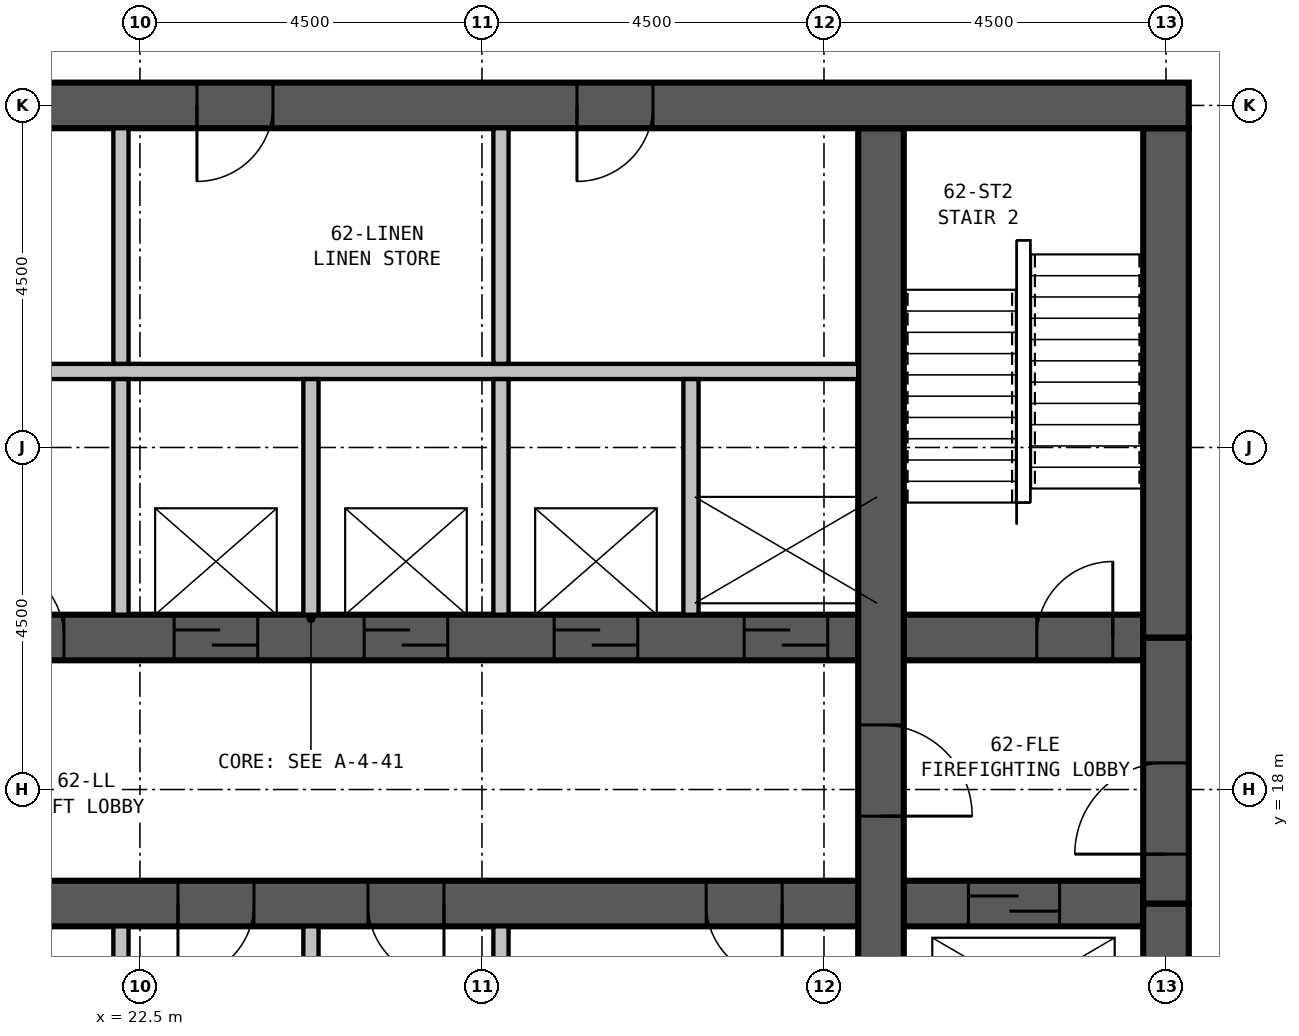
"""IFC4 building model, lengths in metres.
Left out: names, types, materials, properties, quantities, classifications, styles, units other than length and angle.
Written with IfcOpenShell. Run it as: python <this file> out.ifc"""

import sys

from ifc_helpers import new_model, si_unit, direction, frame, frame_2d, origin, place, context, subcontext, project, spatial, rectangle, extrude, element, fill, save


model = new_model("IFC4")
c1 = context("Model", 3, precision=1e-05, world=origin(), true_north=direction((0.0, 1.0)))
c2 = subcontext(c1, "Body", "Model", "MODEL_VIEW")
j1 = project(units=[si_unit("LENGTHUNIT", "METRE"), si_unit("PLANEANGLEUNIT", "RADIAN")], contexts=[c1])
p1 = place(None, origin())
s1 = spatial("IfcSite", under=j1, at=p1, CompositionType="ELEMENT")
p2 = place(p1, origin())
s2 = spatial("IfcBuilding", under=s1, at=p2, CompositionType="ELEMENT")
p3 = place(p2, frame((0.0, 0.0, 240.8)))
s3 = spatial("IfcBuildingStorey", under=s2, at=p3, CompositionType="ELEMENT", Elevation=240.8)
p4 = place(p3, frame((36.3, 27.0, 0.0), z_axis=(0.0, 0.0, 1.0), x_axis=(-1.0, 0.0, 0.0)))
e1 = element("IfcWall", 1, at=p4, inside=s3, PredefinedType="SHEAR", context=c2, shape_type="SweptSolid", body=[
    extrude(rectangle(XDim=23.45, YDim=0.6, at=frame_2d((11.725, 0.0))), origin(), (0.0, 0.0, 1.0), 3.9),
])
p5 = place(p4, frame((17.05, 0.0, 0.0)))
e2 = element("IfcOpeningElement", 2, at=p5, cuts=e1, PredefinedType="OPENING", context=c2, shape_type="SweptSolid", body=[
    extrude(rectangle(XDim=1.0, YDim=2.1, at=frame_2d((0.5, 1.05))), frame((0.0, 0.31, 0.0), z_axis=(0.0, -1.0, 0.0), x_axis=(1.0, 0.0, 0.0)), (0.0, 0.0, 1.0), 0.62),
])
p6 = place(p4, frame((12.05, 0.0, 0.0)))
e3 = element("IfcOpeningElement", 3, at=p6, cuts=e1, PredefinedType="OPENING", context=c2, shape_type="SweptSolid", body=[
    extrude(rectangle(XDim=1.0, YDim=2.1, at=frame_2d((0.5, 1.05))), frame((0.0, 0.31, 0.0), z_axis=(0.0, -1.0, 0.0), x_axis=(1.0, 0.0, 0.0)), (0.0, 0.0, 1.0), 0.62),
])
p7 = place(p4, frame((7.05, 0.0, 0.0)))
e4 = element("IfcOpeningElement", 4, at=p7, cuts=e1, PredefinedType="OPENING", context=c2, shape_type="SweptSolid", body=[
    extrude(rectangle(XDim=1.0, YDim=2.1, at=frame_2d((0.5, 1.05))), frame((0.0, 0.31, 0.0), z_axis=(0.0, -1.0, 0.0), x_axis=(1.0, 0.0, 0.0)), (0.0, 0.0, 1.0), 0.62),
])
p8 = place(p3, frame((32.25, 13.8, 0.0), z_axis=(0.0, 0.0, 1.0), x_axis=(0.0, 1.0, 0.0)))
e5 = element("IfcWall", 5, at=p8, inside=s3, PredefinedType="SHEAR", context=c2, shape_type="SweptSolid", body=[
    extrude(rectangle(XDim=12.9, YDim=0.6, at=frame_2d((6.45, 0.0))), origin(), (0.0, 0.0, 1.0), 3.9),
])
p9 = place(p8, frame((5.05, 0.0, 0.0), z_axis=(0.0, 0.0, 1.0), x_axis=(-1.0, 0.0, 0.0)))
e6 = element("IfcOpeningElement", 6, at=p9, cuts=e5, PredefinedType="OPENING", context=c2, shape_type="SweptSolid", body=[
    extrude(rectangle(XDim=1.2, YDim=2.1, at=frame_2d((0.6, 1.05))), frame((0.0, 0.31, 0.0), z_axis=(0.0, -1.0, 0.0), x_axis=(1.0, 0.0, 0.0)), (0.0, 0.0, 1.0), 0.62),
])
p10 = place(p3, frame((13.8, 16.5, 0.0), z_axis=(0.0, 0.0, 1.0), x_axis=(1.0, 0.0, 0.0)))
e7 = element("IfcWall", 7, at=p10, inside=s3, PredefinedType="SHEAR", context=c2, shape_type="SweptSolid", body=[
    extrude(rectangle(XDim=21.9, YDim=0.6, at=frame_2d((10.95, 0.0))), origin(), (0.0, 0.0, 1.0), 3.9),
])
p11 = place(p10, frame((5.75, 0.0, 0.0), z_axis=(0.0, 0.0, 1.0), x_axis=(-1.0, 0.0, 0.0)))
e8 = element("IfcOpeningElement", 8, at=p11, cuts=e7, PredefinedType="OPENING", context=c2, shape_type="SweptSolid", body=[
    extrude(rectangle(XDim=1.0, YDim=2.1, at=frame_2d((0.5, 1.05))), frame((0.0, 0.31, 0.0), z_axis=(0.0, -1.0, 0.0), x_axis=(1.0, 0.0, 0.0)), (0.0, 0.0, 1.0), 0.62),
])
p12 = place(p10, frame((10.2, 0.0, 0.0), z_axis=(0.0, 0.0, 1.0), x_axis=(-1.0, 0.0, 0.0)))
e9 = element("IfcOpeningElement", 9, at=p12, cuts=e7, PredefinedType="OPENING", context=c2, shape_type="SweptSolid", body=[
    extrude(rectangle(XDim=1.0, YDim=2.1, at=frame_2d((0.5, 1.05))), frame((0.0, 0.31, 0.0), z_axis=(0.0, -1.0, 0.0), x_axis=(1.0, 0.0, 0.0)), (0.0, 0.0, 1.0), 0.62),
])
p13 = place(p10, frame((12.7, 0.0, 0.0), z_axis=(0.0, 0.0, 1.0), x_axis=(-1.0, 0.0, 0.0)))
e10 = element("IfcOpeningElement", 10, at=p13, cuts=e7, PredefinedType="OPENING", context=c2, shape_type="SweptSolid", body=[
    extrude(rectangle(XDim=1.0, YDim=2.1, at=frame_2d((0.5, 1.05))), frame((0.0, 0.31, 0.0), z_axis=(0.0, -1.0, 0.0), x_axis=(1.0, 0.0, 0.0)), (0.0, 0.0, 1.0), 0.62),
])
p14 = place(p10, frame((17.15, 0.0, 0.0), z_axis=(0.0, 0.0, 1.0), x_axis=(-1.0, 0.0, 0.0)))
e11 = element("IfcOpeningElement", 11, at=p14, cuts=e7, PredefinedType="OPENING", context=c2, shape_type="SweptSolid", body=[
    extrude(rectangle(XDim=1.0, YDim=2.1, at=frame_2d((0.5, 1.05))), frame((0.0, 0.31, 0.0), z_axis=(0.0, -1.0, 0.0), x_axis=(1.0, 0.0, 0.0)), (0.0, 0.0, 1.0), 0.62),
])
p15 = place(p10, frame((0.6, 0.0, 0.0)))
e12 = element("IfcOpeningElement", 12, at=p15, cuts=e7, PredefinedType="OPENING", context=c2, shape_type="SweptSolid", body=[
    extrude(rectangle(XDim=1.2, YDim=2.1, at=frame_2d((0.6, 1.05))), frame((0.0, 0.31, 0.0), z_axis=(0.0, -1.0, 0.0), x_axis=(1.0, 0.0, 0.0)), (0.0, 0.0, 1.0), 0.62),
])
p16 = place(p10, frame((19.6, 0.0, 0.0)))
e13 = element("IfcOpeningElement", 13, at=p16, cuts=e7, PredefinedType="OPENING", context=c2, shape_type="SweptSolid", body=[
    extrude(rectangle(XDim=1.2, YDim=2.1, at=frame_2d((0.6, 1.05))), frame((0.0, 0.31, 0.0), z_axis=(0.0, -1.0, 0.0), x_axis=(1.0, 0.0, 0.0)), (0.0, 0.0, 1.0), 0.62),
])
p17 = place(p3, frame((13.8, 20.0, 0.0), z_axis=(0.0, 0.0, 1.0), x_axis=(1.0, 0.0, 0.0)))
e14 = element("IfcWall", 14, at=p17, inside=s3, PredefinedType="SHEAR", context=c2, shape_type="SweptSolid", body=[
    extrude(rectangle(XDim=21.9, YDim=0.6, at=frame_2d((10.95, 0.0))), origin(), (0.0, 0.0, 1.0), 3.9),
])
p18 = place(p17, frame((0.5, 0.0, 0.0)))
e15 = element("IfcOpeningElement", 15, at=p18, cuts=e14, PredefinedType="OPENING", context=c2, shape_type="SweptSolid", body=[
    extrude(rectangle(XDim=1.0, YDim=2.1, at=frame_2d((0.5, 1.05))), frame((0.0, 0.31, 0.0), z_axis=(0.0, -1.0, 0.0), x_axis=(1.0, 0.0, 0.0)), (0.0, 0.0, 1.0), 0.62),
])
p19 = place(p17, frame((20.5, 0.0, 0.0)))
e16 = element("IfcOpeningElement", 16, at=p19, cuts=e14, PredefinedType="OPENING", context=c2, shape_type="SweptSolid", body=[
    extrude(rectangle(XDim=1.0, YDim=2.1, at=frame_2d((0.5, 1.05))), frame((0.0, 0.31, 0.0), z_axis=(0.0, -1.0, 0.0), x_axis=(1.0, 0.0, 0.0)), (0.0, 0.0, 1.0), 0.62),
])
p20 = place(p17, frame((9.15, 0.0, 0.0)))
e17 = element("IfcOpeningElement", 17, at=p20, cuts=e14, PredefinedType="OPENING", context=c2, shape_type="SweptSolid", body=[
    extrude(rectangle(XDim=1.1, YDim=2.1, at=frame_2d((0.55, 1.05))), frame((0.0, 0.31, 0.0), z_axis=(0.0, -1.0, 0.0), x_axis=(1.0, 0.0, 0.0)), (0.0, 0.0, 1.0), 0.62),
])
p21 = place(p17, frame((11.65, 0.0, 0.0)))
e18 = element("IfcOpeningElement", 18, at=p21, cuts=e14, PredefinedType="OPENING", context=c2, shape_type="SweptSolid", body=[
    extrude(rectangle(XDim=1.1, YDim=2.1, at=frame_2d((0.55, 1.05))), frame((0.0, 0.31, 0.0), z_axis=(0.0, -1.0, 0.0), x_axis=(1.0, 0.0, 0.0)), (0.0, 0.0, 1.0), 0.62),
])
p22 = place(p17, frame((14.15, 0.0, 0.0)))
e19 = element("IfcOpeningElement", 19, at=p22, cuts=e14, PredefinedType="OPENING", context=c2, shape_type="SweptSolid", body=[
    extrude(rectangle(XDim=1.1, YDim=2.1, at=frame_2d((0.55, 1.05))), frame((0.0, 0.31, 0.0), z_axis=(0.0, -1.0, 0.0), x_axis=(1.0, 0.0, 0.0)), (0.0, 0.0, 1.0), 0.62),
])
p23 = place(p17, frame((16.65, 0.0, 0.0)))
e20 = element("IfcOpeningElement", 20, at=p23, cuts=e14, PredefinedType="OPENING", context=c2, shape_type="SweptSolid", body=[
    extrude(rectangle(XDim=1.1, YDim=2.1, at=frame_2d((0.55, 1.05))), frame((0.0, 0.31, 0.0), z_axis=(0.0, -1.0, 0.0), x_axis=(1.0, 0.0, 0.0)), (0.0, 0.0, 1.0), 0.62),
])
p24 = place(p17, frame((5.75, 0.0, 0.0), z_axis=(0.0, 0.0, 1.0), x_axis=(-1.0, 0.0, 0.0)))
e21 = element("IfcOpeningElement", 21, at=p24, cuts=e14, PredefinedType="OPENING", context=c2, shape_type="SweptSolid", body=[
    extrude(rectangle(XDim=1.0, YDim=2.1, at=frame_2d((0.5, 1.05))), frame((0.0, 0.31, 0.0), z_axis=(0.0, -1.0, 0.0), x_axis=(1.0, 0.0, 0.0)), (0.0, 0.0, 1.0), 0.62),
])
p25 = place(p17, frame((6.7, 0.0, 0.0)))
e22 = element("IfcOpeningElement", 22, at=p25, cuts=e14, PredefinedType="OPENING", context=c2, shape_type="SweptSolid", body=[
    extrude(rectangle(XDim=1.0, YDim=2.1, at=frame_2d((0.5, 1.05))), frame((0.0, 0.31, 0.0), z_axis=(0.0, -1.0, 0.0), x_axis=(1.0, 0.0, 0.0)), (0.0, 0.0, 1.0), 0.62),
])
p26 = place(p3, frame((36.0, 13.8, 0.0), z_axis=(0.0, 0.0, 1.0), x_axis=(0.0, 1.0, 0.0)))
e23 = element("IfcWall", 23, at=p26, inside=s3, PredefinedType="SHEAR", context=c2, shape_type="SweptSolid", body=[
    extrude(rectangle(XDim=2.7, YDim=0.6, at=frame_2d((1.35, 0.0))), origin(), (0.0, 0.0, 1.0), 3.9),
])
p27 = place(p3, frame((36.0, 16.5, 0.0), z_axis=(0.0, 0.0, 1.0), x_axis=(0.0, 1.0, 0.0)))
e24 = element("IfcWall", 24, at=p27, inside=s3, PredefinedType="SHEAR", context=c2, shape_type="SweptSolid", body=[
    extrude(rectangle(XDim=3.5, YDim=0.6, at=frame_2d((1.75, 0.0))), origin(), (0.0, 0.0, 1.0), 3.9),
])
p28 = place(p27, frame((0.65, 0.0, 0.0)))
e25 = element("IfcOpeningElement", 25, at=p28, cuts=e24, PredefinedType="OPENING", context=c2, shape_type="SweptSolid", body=[
    extrude(rectangle(XDim=1.2, YDim=2.1, at=frame_2d((0.6, 1.05))), frame((0.0, 0.31, 0.0), z_axis=(0.0, -1.0, 0.0), x_axis=(1.0, 0.0, 0.0)), (0.0, 0.0, 1.0), 0.62),
])
p29 = place(p3, frame((36.0, 20.0, 0.0), z_axis=(0.0, 0.0, 1.0), x_axis=(0.0, 1.0, 0.0)))
e26 = element("IfcWall", 26, at=p29, inside=s3, PredefinedType="SHEAR", context=c2, shape_type="SweptSolid", body=[
    extrude(rectangle(XDim=6.7, YDim=0.6, at=frame_2d((3.35, 0.0))), origin(), (0.0, 0.0, 1.0), 3.9),
])
p30 = place(p3, frame((22.25, 13.8, 0.0), z_axis=(0.0, 0.0, 1.0), x_axis=(0.0, 1.0, 0.0)))
e27 = element("IfcWall", 27, at=p30, inside=s3, PredefinedType="PARTITIONING", context=c2, shape_type="SweptSolid", body=[
    extrude(rectangle(XDim=2.4, YDim=0.2, at=frame_2d((1.2, 0.0))), origin(), (0.0, 0.0, 1.0), 3.65),
])
p31 = place(p3, frame((22.25, 20.3, 0.0), z_axis=(0.0, 0.0, 1.0), x_axis=(0.0, 1.0, 0.0)))
e28 = element("IfcWall", 28, at=p31, inside=s3, PredefinedType="PARTITIONING", context=c2, shape_type="SweptSolid", body=[
    extrude(rectangle(XDim=3.1, YDim=0.2, at=frame_2d((1.55, 0.0))), origin(), (0.0, 0.0, 1.0), 3.65),
])
p32 = place(p3, frame((24.75, 13.8, 0.0), z_axis=(0.0, 0.0, 1.0), x_axis=(0.0, 1.0, 0.0)))
e29 = element("IfcWall", 29, at=p32, inside=s3, PredefinedType="PARTITIONING", context=c2, shape_type="SweptSolid", body=[
    extrude(rectangle(XDim=2.4, YDim=0.2, at=frame_2d((1.2, 0.0))), origin(), (0.0, 0.0, 1.0), 3.65),
])
p33 = place(p3, frame((24.75, 20.3, 0.0), z_axis=(0.0, 0.0, 1.0), x_axis=(0.0, 1.0, 0.0)))
e30 = element("IfcWall", 30, at=p33, inside=s3, PredefinedType="PARTITIONING", context=c2, shape_type="SweptSolid", body=[
    extrude(rectangle(XDim=3.1, YDim=0.2, at=frame_2d((1.55, 0.0))), origin(), (0.0, 0.0, 1.0), 3.65),
])
p34 = place(p3, frame((27.25, 13.8, 0.0), z_axis=(0.0, 0.0, 1.0), x_axis=(0.0, 1.0, 0.0)))
e31 = element("IfcWall", 31, at=p34, inside=s3, PredefinedType="PARTITIONING", context=c2, shape_type="SweptSolid", body=[
    extrude(rectangle(XDim=2.4, YDim=0.2, at=frame_2d((1.2, 0.0))), origin(), (0.0, 0.0, 1.0), 3.65),
])
for number, where, z_axis, x_axis in (
    (32, (27.25, 20.3, 0.0), (0.0, 0.0, 1.0), (0.0, 1.0, 0.0)),
    (33, (29.75, 20.3, 0.0), (0.0, 0.0, 1.0), (0.0, 1.0, 0.0)),
):
    element("IfcWall", number, at=place(p3, frame(where, z_axis=z_axis, x_axis=x_axis)), inside=s3, PredefinedType="PARTITIONING", context=c2, shape_type="SweptSolid", body=[
        extrude(rectangle(XDim=3.1, YDim=0.2, at=frame_2d((1.55, 0.0))), origin(), (0.0, 0.0, 1.0), 3.65),
    ])
p35 = place(p3, frame((17.55, 23.5, 0.0), z_axis=(0.0, 0.0, 1.0), x_axis=(1.0, 0.0, 0.0)))
e34 = element("IfcWall", 34, at=p35, inside=s3, PredefinedType="PARTITIONING", context=c2, shape_type="SweptSolid", body=[
    extrude(rectangle(XDim=14.4, YDim=0.2, at=frame_2d((7.2, 0.0))), origin(), (0.0, 0.0, 1.0), 3.65),
])
p36 = place(p35, frame((0.45, 0.0, 0.0)))
e35 = element("IfcOpeningElement", 35, at=p36, cuts=e34, PredefinedType="OPENING", context=c2, shape_type="SweptSolid", body=[
    extrude(rectangle(XDim=1.0, YDim=2.1, at=frame_2d((0.5, 1.05))), frame((0.0, 0.11, 0.0), z_axis=(0.0, -1.0, 0.0), x_axis=(1.0, 0.0, 0.0)), (0.0, 0.0, 1.0), 0.22),
])
for number, where, z_axis, x_axis in (
    (36, (22.25, 23.6, 0.0), (0.0, 0.0, 1.0), (0.0, 1.0, 0.0)),
    (37, (27.25, 23.6, 0.0), (0.0, 0.0, 1.0), (0.0, 1.0, 0.0)),
):
    element("IfcWall", number, at=place(p3, frame(where, z_axis=z_axis, x_axis=x_axis)), inside=s3, PredefinedType="PARTITIONING", context=c2, shape_type="SweptSolid", body=[
        extrude(rectangle(XDim=3.1, YDim=0.2, at=frame_2d((1.55, 0.0))), origin(), (0.0, 0.0, 1.0), 3.65),
    ])
p37 = place(p28, origin())
e38 = element("IfcDoor", 38, at=p37, inside=s3, OperationType="SINGLE_SWING_LEFT", PredefinedType="DOOR", context=c2, shape_type="SweptSolid", body=[
    extrude(rectangle(XDim=1.2, YDim=2.1, at=frame_2d((0.6, 1.05))), frame((0.0, 0.3, 0.0), z_axis=(0.0, -1.0, 0.0), x_axis=(1.0, 0.0, 0.0)), (0.0, 0.0, 1.0), 0.6),
])
fill(e25, e38)
p38 = place(p9, origin())
e39 = element("IfcDoor", 39, at=p38, inside=s3, OperationType="SINGLE_SWING_RIGHT", PredefinedType="DOOR", context=c2, shape_type="SweptSolid", body=[
    extrude(rectangle(XDim=1.2, YDim=2.1, at=frame_2d((0.6, 1.05))), frame((0.0, 0.3, 0.0), z_axis=(0.0, -1.0, 0.0), x_axis=(1.0, 0.0, 0.0)), (0.0, 0.0, 1.0), 0.6),
])
fill(e6, e39)
p39 = place(p19, origin())
e40 = element("IfcDoor", 40, at=p39, inside=s3, OperationType="SINGLE_SWING_RIGHT", PredefinedType="DOOR", context=c2, shape_type="SweptSolid", body=[
    extrude(rectangle(XDim=1.0, YDim=2.1, at=frame_2d((0.5, 1.05))), frame((0.0, 0.3, 0.0), z_axis=(0.0, -1.0, 0.0), x_axis=(1.0, 0.0, 0.0)), (0.0, 0.0, 1.0), 0.6),
])
fill(e16, e40)
p40 = place(p20, origin())
e41 = element("IfcDoor", 41, at=p40, inside=s3, OperationType="SLIDING_TO_LEFT", PredefinedType="DOOR", context=c2, shape_type="SweptSolid", body=[
    extrude(rectangle(XDim=1.1, YDim=2.1, at=frame_2d((0.55, 1.05))), frame((0.0, 0.3, 0.0), z_axis=(0.0, -1.0, 0.0), x_axis=(1.0, 0.0, 0.0)), (0.0, 0.0, 1.0), 0.6),
])
fill(e17, e41)
p41 = place(p21, origin())
e42 = element("IfcDoor", 42, at=p41, inside=s3, OperationType="SLIDING_TO_LEFT", PredefinedType="DOOR", context=c2, shape_type="SweptSolid", body=[
    extrude(rectangle(XDim=1.1, YDim=2.1, at=frame_2d((0.55, 1.05))), frame((0.0, 0.3, 0.0), z_axis=(0.0, -1.0, 0.0), x_axis=(1.0, 0.0, 0.0)), (0.0, 0.0, 1.0), 0.6),
])
fill(e18, e42)
p42 = place(p22, origin())
e43 = element("IfcDoor", 43, at=p42, inside=s3, OperationType="SLIDING_TO_LEFT", PredefinedType="DOOR", context=c2, shape_type="SweptSolid", body=[
    extrude(rectangle(XDim=1.1, YDim=2.1, at=frame_2d((0.55, 1.05))), frame((0.0, 0.3, 0.0), z_axis=(0.0, -1.0, 0.0), x_axis=(1.0, 0.0, 0.0)), (0.0, 0.0, 1.0), 0.6),
])
fill(e19, e43)
p43 = place(p23, origin())
e44 = element("IfcDoor", 44, at=p43, inside=s3, OperationType="SLIDING_TO_LEFT", PredefinedType="DOOR", context=c2, shape_type="SweptSolid", body=[
    extrude(rectangle(XDim=1.1, YDim=2.1, at=frame_2d((0.55, 1.05))), frame((0.0, 0.3, 0.0), z_axis=(0.0, -1.0, 0.0), x_axis=(1.0, 0.0, 0.0)), (0.0, 0.0, 1.0), 0.6),
])
fill(e20, e44)
p44 = place(p12, origin())
e45 = element("IfcDoor", 45, at=p44, inside=s3, OperationType="SINGLE_SWING_RIGHT", PredefinedType="DOOR", context=c2, shape_type="SweptSolid", body=[
    extrude(rectangle(XDim=1.0, YDim=2.1, at=frame_2d((0.5, 1.05))), frame((0.0, 0.3, 0.0), z_axis=(0.0, -1.0, 0.0), x_axis=(1.0, 0.0, 0.0)), (0.0, 0.0, 1.0), 0.6),
])
fill(e9, e45)
p45 = place(p13, origin())
e46 = element("IfcDoor", 46, at=p45, inside=s3, OperationType="SINGLE_SWING_LEFT", PredefinedType="DOOR", context=c2, shape_type="SweptSolid", body=[
    extrude(rectangle(XDim=1.0, YDim=2.1, at=frame_2d((0.5, 1.05))), frame((0.0, 0.3, 0.0), z_axis=(0.0, -1.0, 0.0), x_axis=(1.0, 0.0, 0.0)), (0.0, 0.0, 1.0), 0.6),
])
fill(e10, e46)
p46 = place(p14, origin())
e47 = element("IfcDoor", 47, at=p46, inside=s3, OperationType="SINGLE_SWING_LEFT", PredefinedType="DOOR", context=c2, shape_type="SweptSolid", body=[
    extrude(rectangle(XDim=1.0, YDim=2.1, at=frame_2d((0.5, 1.05))), frame((0.0, 0.3, 0.0), z_axis=(0.0, -1.0, 0.0), x_axis=(1.0, 0.0, 0.0)), (0.0, 0.0, 1.0), 0.6),
])
fill(e11, e47)
p47 = place(p25, origin())
e48 = element("IfcDoor", 48, at=p47, inside=s3, OperationType="SINGLE_SWING_LEFT", PredefinedType="DOOR", context=c2, shape_type="SweptSolid", body=[
    extrude(rectangle(XDim=1.0, YDim=2.1, at=frame_2d((0.5, 1.05))), frame((0.0, 0.3, 0.0), z_axis=(0.0, -1.0, 0.0), x_axis=(1.0, 0.0, 0.0)), (0.0, 0.0, 1.0), 0.6),
])
fill(e22, e48)
p48 = place(p16, origin())
e49 = element("IfcDoor", 49, at=p48, inside=s3, OperationType="SLIDING_TO_LEFT", PredefinedType="DOOR", context=c2, shape_type="SweptSolid", body=[
    extrude(rectangle(XDim=1.2, YDim=2.1, at=frame_2d((0.6, 1.05))), frame((0.0, 0.3, 0.0), z_axis=(0.0, -1.0, 0.0), x_axis=(1.0, 0.0, 0.0)), (0.0, 0.0, 1.0), 0.6),
])
fill(e13, e49)
p49 = place(p6, origin())
e50 = element("IfcDoor", 50, at=p49, inside=s3, OperationType="SINGLE_SWING_RIGHT", PredefinedType="DOOR", context=c2, shape_type="SweptSolid", body=[
    extrude(rectangle(XDim=1.0, YDim=2.1, at=frame_2d((0.5, 1.05))), frame((0.0, 0.3, 0.0), z_axis=(0.0, -1.0, 0.0), x_axis=(1.0, 0.0, 0.0)), (0.0, 0.0, 1.0), 0.6),
])
fill(e3, e50)
p50 = place(p7, origin())
e51 = element("IfcDoor", 51, at=p50, inside=s3, OperationType="SINGLE_SWING_RIGHT", PredefinedType="DOOR", context=c2, shape_type="SweptSolid", body=[
    extrude(rectangle(XDim=1.0, YDim=2.1, at=frame_2d((0.5, 1.05))), frame((0.0, 0.3, 0.0), z_axis=(0.0, -1.0, 0.0), x_axis=(1.0, 0.0, 0.0)), (0.0, 0.0, 1.0), 0.6),
])
fill(e4, e51)
save(model, sys.argv[1])
